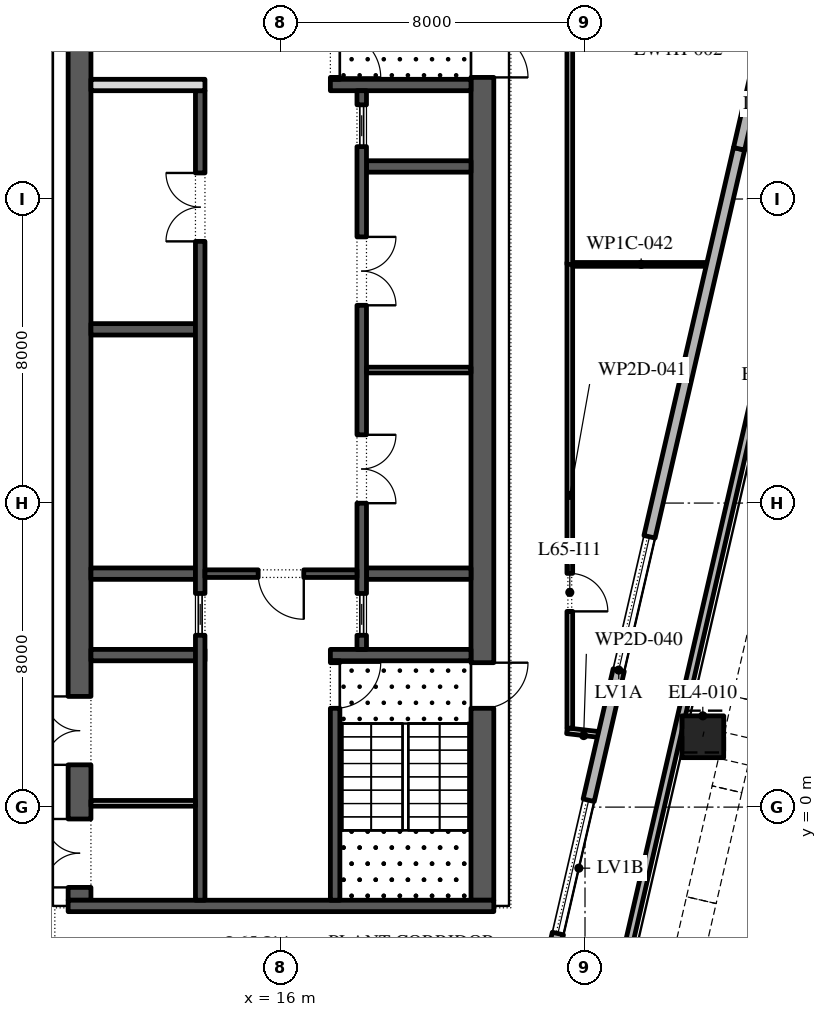
"""IFC4 building model, lengths in metres.
Left out: names, types, materials, properties, quantities, classifications, styles, units other than length and angle.
Written with IfcOpenShell. Run it as: python <this file> out.ifc"""

import sys

from ifc_helpers import new_model, si_unit, direction, frame, frame_2d, origin, origin_2d, place, context, subcontext, project, spatial, rectangle, extrude, element, fill, save


model = new_model("IFC4")
c1 = context("Model", 3, precision=1e-05, world=origin(), true_north=direction((0.0, 1.0)))
c2 = subcontext(c1, "Body", "Model", "MODEL_VIEW")
j1 = project(units=[si_unit("LENGTHUNIT", "METRE"), si_unit("PLANEANGLEUNIT", "RADIAN")], contexts=[c1])
p1 = place(None, origin())
s1 = spatial("IfcSite", under=j1, at=p1, CompositionType="ELEMENT")
p2 = place(p1, origin())
s2 = spatial("IfcBuilding", under=s1, at=p2, CompositionType="ELEMENT")
p3 = place(p2, frame((0.0, 0.0, 297.6)))
s3 = spatial("IfcBuildingStorey", under=s2, at=p3, CompositionType="ELEMENT", Elevation=297.6)
p4 = place(p3, frame((27.099, 1.851, 0.0), z_axis=(0.005875588108, 0.025265028863, 0.999663521282), x_axis=(-0.974008027039, 0.22651349466, 0.0)))
e1 = element("IfcColumn", 1, at=p4, inside=s3, PredefinedType="COLUMN", context=c2, shape_type="SweptSolid", body=[
    extrude(rectangle(XDim=1.1, YDim=1.1, at=origin_2d()), origin(), (0.0, 0.0, 1.0), 5.402),
])
p5 = place(p3, frame((22.757, -13.982, -0.05), z_axis=(0.0, 0.0, 1.0), x_axis=(0.224947491476, 0.974370887331, 0.0)))
e2 = element("IfcWall", 2, at=p5, inside=s3, PredefinedType="STANDARD", context=c2, shape_type="SweptSolid", body=[
    extrude(rectangle(XDim=58.769, YDim=0.2, at=frame_2d((29.385, 0.0))), origin(), (0.0, 0.0, 1.0), 1.1),
])
p6 = place(p3, frame((21.3, -2.45, 0.0), z_axis=(0.0, 0.0, 1.0), x_axis=(0.0, 1.0, 0.0)))
e3 = element("IfcWall", 3, at=p6, inside=s3, PredefinedType="SHEAR", context=c2, shape_type="SweptSolid", body=[
    extrude(rectangle(XDim=27.9, YDim=0.6, at=frame_2d((13.95, 0.0))), origin(), (0.0, 0.0, 1.0), 4.95),
])
p7 = place(p6, frame((5.05, 0.0, 0.0)))
e4 = element("IfcOpeningElement", 4, at=p7, cuts=e3, PredefinedType="OPENING", context=c2, shape_type="SweptSolid", body=[
    extrude(rectangle(XDim=1.2, YDim=2.1, at=frame_2d((0.6, 1.05))), frame((0.0, 0.31, 0.0), z_axis=(0.0, -1.0, 0.0), x_axis=(1.0, 0.0, 0.0)), (0.0, 0.0, 1.0), 0.62),
])
p8 = place(p6, frame((21.65, 0.0, 0.0)))
e5 = element("IfcOpeningElement", 5, at=p8, cuts=e3, PredefinedType="OPENING", context=c2, shape_type="SweptSolid", body=[
    extrude(rectangle(XDim=1.2, YDim=2.1, at=frame_2d((0.6, 1.05))), frame((0.0, 0.31, 0.0), z_axis=(0.0, -1.0, 0.0), x_axis=(1.0, 0.0, 0.0)), (0.0, 0.0, 1.0), 0.62),
])
p9 = place(p3, frame((10.7, -2.45, 0.0), z_axis=(0.0, 0.0, 1.0), x_axis=(0.0, 1.0, 0.0)))
e6 = element("IfcWall", 6, at=p9, inside=s3, PredefinedType="SHEAR", context=c2, shape_type="SweptSolid", body=[
    extrude(rectangle(XDim=27.9, YDim=0.6, at=frame_2d((13.95, 0.0))), origin(), (0.0, 0.0, 1.0), 4.95),
])
p10 = place(p9, frame((23.65, 0.0, 0.0)))
e7 = element("IfcOpeningElement", 7, at=p10, cuts=e6, PredefinedType="OPENING", context=c2, shape_type="SweptSolid", body=[
    extrude(rectangle(XDim=2.4, YDim=2.1, at=frame_2d((1.2, 1.05))), frame((0.0, 0.31, 0.0), z_axis=(0.0, -1.0, 0.0), x_axis=(1.0, 0.0, 0.0)), (0.0, 0.0, 1.0), 0.62),
])
p11 = place(p9, frame((0.337, 0.0, 0.0)))
e8 = element("IfcOpeningElement", 8, at=p11, cuts=e6, PredefinedType="OPENING", context=c2, shape_type="SweptSolid", body=[
    extrude(rectangle(XDim=1.8, YDim=2.4, at=frame_2d((0.9, 1.2))), frame((0.0, 0.31, 0.0), z_axis=(0.0, -1.0, 0.0), x_axis=(1.0, 0.0, 0.0)), (0.0, 0.0, 1.0), 0.62),
])
p12 = place(p9, frame((3.562, 0.0, 0.0)))
e9 = element("IfcOpeningElement", 9, at=p12, cuts=e6, PredefinedType="OPENING", context=c2, shape_type="SweptSolid", body=[
    extrude(rectangle(XDim=1.8, YDim=2.4, at=frame_2d((0.9, 1.2))), frame((0.0, 0.31, 0.0), z_axis=(0.0, -1.0, 0.0), x_axis=(1.0, 0.0, 0.0)), (0.0, 0.0, 1.0), 0.62),
])
p13 = place(p3, frame((10.4, -2.6, 0.0), z_axis=(0.0, 0.0, 1.0), x_axis=(1.0, 0.0, 0.0)))
e10 = element("IfcWall", 10, at=p13, inside=s3, PredefinedType="SHEAR", context=c2, shape_type="SweptSolid", body=[
    extrude(rectangle(XDim=11.2, YDim=0.3, at=frame_2d((5.6, 0.0))), origin(), (0.0, 0.0, 1.0), 4.95),
])
p14 = place(p3, frame((17.3, 4.0, 0.0), z_axis=(0.0, 0.0, 1.0), x_axis=(1.0, 0.0, 0.0)))
e11 = element("IfcWall", 11, at=p14, inside=s3, PredefinedType="SHEAR", context=c2, shape_type="SweptSolid", body=[
    extrude(rectangle(XDim=3.7, YDim=0.3, at=frame_2d((1.85, 0.0))), origin(), (0.0, 0.0, 1.0), 4.95),
])
p15 = place(p3, frame((17.425, -2.45, 0.0), z_axis=(0.0, 0.0, 1.0), x_axis=(0.0, 1.0, 0.0)))
e12 = element("IfcWall", 12, at=p15, inside=s3, PredefinedType="SHEAR", context=c2, shape_type="SweptSolid", body=[
    extrude(rectangle(XDim=6.3, YDim=0.25, at=frame_2d((3.15, 0.0))), origin(), (0.0, 0.0, 1.0), 4.95),
])
p16 = place(p15, frame((5.05, 0.0, 0.0)))
e13 = element("IfcOpeningElement", 13, at=p16, cuts=e12, PredefinedType="OPENING", context=c2, shape_type="SweptSolid", body=[
    extrude(rectangle(XDim=1.2, YDim=2.1, at=frame_2d((0.6, 1.05))), frame((0.0, 0.135, 0.0), z_axis=(0.0, -1.0, 0.0), x_axis=(1.0, 0.0, 0.0)), (0.0, 0.0, 1.0), 0.27),
])
p17 = place(p3, frame((17.3, 19.0, 0.0), z_axis=(0.0, 0.0, 1.0), x_axis=(1.0, 0.0, 0.0)))
e14 = element("IfcWall", 14, at=p17, inside=s3, PredefinedType="SHEAR", context=c2, shape_type="SweptSolid", body=[
    extrude(rectangle(XDim=3.7, YDim=0.3, at=frame_2d((1.85, 0.0))), origin(), (0.0, 0.0, 1.0), 4.95),
])
p18 = place(p3, frame((17.425, 19.15, 0.0), z_axis=(0.0, 0.0, 1.0), x_axis=(0.0, 1.0, 0.0)))
e15 = element("IfcWall", 15, at=p18, inside=s3, PredefinedType="SHEAR", context=c2, shape_type="SweptSolid", body=[
    extrude(rectangle(XDim=6.3, YDim=0.25, at=frame_2d((3.15, 0.0))), origin(), (0.0, 0.0, 1.0), 4.95),
])
p19 = place(p18, frame((0.05, 0.0, 0.0)))
e16 = element("IfcOpeningElement", 16, at=p19, cuts=e15, PredefinedType="OPENING", context=c2, shape_type="SweptSolid", body=[
    extrude(rectangle(XDim=1.2, YDim=2.1, at=frame_2d((0.6, 1.05))), frame((0.0, 0.135, 0.0), z_axis=(0.0, -1.0, 0.0), x_axis=(1.0, 0.0, 0.0)), (0.0, 0.0, 1.0), 0.27),
])
for number, where, z_axis, x_axis in (
    (17, (18.25, 6.143, 0.0), (0.0, 0.0, 1.0), (1.0, 0.0, 0.0)),
    (18, (18.25, 16.857, 0.0), (0.0, 0.0, 1.0), (1.0, 0.0, 0.0)),
):
    element("IfcWall", number, at=place(p3, frame(where, z_axis=z_axis, x_axis=x_axis)), inside=s3, PredefinedType="SHEAR", context=c2, shape_type="SweptSolid", body=[
        extrude(rectangle(XDim=2.75, YDim=0.3, at=frame_2d((1.375, 0.0))), origin(), (0.0, 0.0, 1.0), 4.95),
    ])
p20 = place(p3, frame((18.125, 4.15, 0.0), z_axis=(0.0, 0.0, 1.0), x_axis=(0.0, 1.0, 0.0)))
e19 = element("IfcWall", 19, at=p20, inside=s3, PredefinedType="SHEAR", context=c2, shape_type="SweptSolid", body=[
    extrude(rectangle(XDim=14.7, YDim=0.25, at=frame_2d((7.35, 0.0))), origin(), (0.0, 0.0, 1.0), 4.95),
])
p21 = place(p20, frame((3.846, 0.0, 0.0)))
e20 = element("IfcOpeningElement", 20, at=p21, cuts=e19, PredefinedType="OPENING", context=c2, shape_type="SweptSolid", body=[
    extrude(rectangle(XDim=1.8, YDim=2.4, at=frame_2d((0.9, 1.2))), frame((0.0, 0.135, 0.0), z_axis=(0.0, -1.0, 0.0), x_axis=(1.0, 0.0, 0.0)), (0.0, 0.0, 1.0), 0.27),
])
p22 = place(p20, frame((9.054, 0.0, 0.0)))
e21 = element("IfcOpeningElement", 21, at=p22, cuts=e19, PredefinedType="OPENING", context=c2, shape_type="SweptSolid", body=[
    extrude(rectangle(XDim=1.8, YDim=2.4, at=frame_2d((0.9, 1.2))), frame((0.0, 0.135, 0.0), z_axis=(0.0, -1.0, 0.0), x_axis=(1.0, 0.0, 0.0)), (0.0, 0.0, 1.0), 0.27),
])
p23 = place(p20, frame((0.371, 0.0, 0.0)))
e22 = element("IfcOpeningElement", 22, at=p23, cuts=e19, PredefinedType="OPENING", context=c2, shape_type="SweptSolid", body=[
    extrude(rectangle(XDim=1.1, YDim=2.1, at=frame_2d((0.55, 1.05))), frame((0.0, 0.135, 0.0), z_axis=(0.0, -1.0, 0.0), x_axis=(1.0, 0.0, 0.0)), (0.0, 0.0, 1.0), 0.27),
])
p24 = place(p20, frame((13.229, 0.0, 0.0)))
e23 = element("IfcOpeningElement", 23, at=p24, cuts=e19, PredefinedType="OPENING", context=c2, shape_type="SweptSolid", body=[
    extrude(rectangle(XDim=1.1, YDim=2.1, at=frame_2d((0.55, 1.05))), frame((0.0, 0.135, 0.0), z_axis=(0.0, -1.0, 0.0), x_axis=(1.0, 0.0, 0.0)), (0.0, 0.0, 1.0), 0.27),
])
p25 = place(p3, frame((18.25, 11.5, 0.0), z_axis=(0.0, 0.0, 1.0), x_axis=(1.0, 0.0, 0.0)))
e24 = element("IfcWall", 24, at=p25, inside=s3, PredefinedType="PARTITIONING", context=c2, shape_type="SweptSolid", body=[
    extrude(rectangle(XDim=2.75, YDim=0.15, at=frame_2d((1.375, 0.0))), origin(), (0.0, 0.0, 1.0), 4.95),
])
p26 = place(p3, frame((11.0, 4.0, 0.0), z_axis=(0.0, 0.0, 1.0), x_axis=(1.0, 0.0, 0.0)))
e25 = element("IfcWall", 25, at=p26, inside=s3, PredefinedType="SHEAR", context=c2, shape_type="SweptSolid", body=[
    extrude(rectangle(XDim=3.0, YDim=0.3, at=frame_2d((1.5, 0.0))), origin(), (0.0, 0.0, 1.0), 4.95),
])
for number, where, z_axis, x_axis in (
    (26, (11.0, 6.143, 0.0), (0.0, 0.0, 1.0), (1.0, 0.0, 0.0)),
    (27, (11.0, 12.571, 0.0), (0.0, 0.0, 1.0), (1.0, 0.0, 0.0)),
):
    element("IfcWall", number, at=place(p3, frame(where, z_axis=z_axis, x_axis=x_axis)), inside=s3, PredefinedType="SHEAR", context=c2, shape_type="SweptSolid", body=[
        extrude(rectangle(XDim=2.75, YDim=0.3, at=frame_2d((1.375, 0.0))), origin(), (0.0, 0.0, 1.0), 4.95),
    ])
p27 = place(p3, frame((13.875, -2.45, 0.0), z_axis=(0.0, 0.0, 1.0), x_axis=(0.0, 1.0, 0.0)))
e28 = element("IfcWall", 28, at=p27, inside=s3, PredefinedType="SHEAR", context=c2, shape_type="SweptSolid", body=[
    extrude(rectangle(XDim=21.3, YDim=0.25, at=frame_2d((10.65, 0.0))), origin(), (0.0, 0.0, 1.0), 4.95),
])
p28 = place(p27, frame((17.336, 0.0, 0.0)))
e29 = element("IfcOpeningElement", 29, at=p28, cuts=e28, PredefinedType="OPENING", context=c2, shape_type="SweptSolid", body=[
    extrude(rectangle(XDim=1.8, YDim=2.4, at=frame_2d((0.9, 1.2))), frame((0.0, 0.135, 0.0), z_axis=(0.0, -1.0, 0.0), x_axis=(1.0, 0.0, 0.0)), (0.0, 0.0, 1.0), 0.27),
])
p29 = place(p27, frame((6.971, 0.0, 0.0)))
e30 = element("IfcOpeningElement", 30, at=p29, cuts=e28, PredefinedType="OPENING", context=c2, shape_type="SweptSolid", body=[
    extrude(rectangle(XDim=1.1, YDim=2.1, at=frame_2d((0.55, 1.05))), frame((0.0, 0.135, 0.0), z_axis=(0.0, -1.0, 0.0), x_axis=(1.0, 0.0, 0.0)), (0.0, 0.0, 1.0), 0.27),
])
p30 = place(p3, frame((11.0, 19.0, 0.0), z_axis=(0.0, 0.0, 1.0), x_axis=(1.0, 0.0, 0.0)))
e31 = element("IfcWall", 31, at=p30, inside=s3, PredefinedType="PARTITIONING", context=c2, shape_type="SweptSolid", body=[
    extrude(rectangle(XDim=3.0, YDim=0.3, at=frame_2d((1.5, 0.0))), origin(), (0.0, 0.0, 1.0), 4.95),
])
p31 = place(p3, frame((14.0, 6.143, 0.0), z_axis=(0.0, 0.0, 1.0), x_axis=(1.0, 0.0, 0.0)))
e32 = element("IfcWall", 32, at=p31, inside=s3, PredefinedType="SHEAR", context=c2, shape_type="SweptSolid", body=[
    extrude(rectangle(XDim=4.0, YDim=0.2, at=frame_2d((2.0, 0.0))), origin(), (0.0, 0.0, 1.0), 4.95),
])
p32 = place(p31, frame((1.4, 0.0, 0.0)))
e33 = element("IfcOpeningElement", 33, at=p32, cuts=e32, PredefinedType="OPENING", context=c2, shape_type="SweptSolid", body=[
    extrude(rectangle(XDim=1.2, YDim=2.1, at=frame_2d((0.6, 1.05))), frame((0.0, 0.11, 0.0), z_axis=(0.0, -1.0, 0.0), x_axis=(1.0, 0.0, 0.0)), (0.0, 0.0, 1.0), 0.22),
])
p33 = place(p3, frame((11.0, 0.1, 0.0), z_axis=(0.0, 0.0, 1.0), x_axis=(1.0, 0.0, 0.0)))
e34 = element("IfcWall", 34, at=p33, inside=s3, PredefinedType="PARTITIONING", context=c2, shape_type="SweptSolid", body=[
    extrude(rectangle(XDim=2.75, YDim=0.15, at=frame_2d((1.375, 0.0))), origin(), (0.0, 0.0, 1.0), 4.95),
])
p34 = place(p3, frame((23.525, 2.009, 0.0), z_axis=(0.0, 0.0, 1.0), x_axis=(0.993362737156, -0.115023790712, 0.0)))
e35 = element("IfcWall", 35, at=p34, inside=s3, PredefinedType="PARTITIONING", context=c2, shape_type="SweptSolid", body=[
    extrude(rectangle(XDim=0.904, YDim=0.15, at=frame_2d((0.452, 0.0))), origin(), (0.0, 0.0, 1.0), 4.95),
])
p35 = place(p3, frame((23.6, 14.33, 0.0), z_axis=(0.0, 0.0, 1.0), x_axis=(0.0, -1.0, 0.0)))
e36 = element("IfcWall", 36, at=p35, inside=s3, PredefinedType="PARTITIONING", context=c2, shape_type="SweptSolid", body=[
    extrude(rectangle(XDim=12.255, YDim=0.15, at=frame_2d((6.127, 0.0))), origin(), (0.0, 0.0, 1.0), 4.95),
])
p36 = place(p35, frame((8.18, 0.0, 0.0)))
e37 = element("IfcOpeningElement", 37, at=p36, cuts=e36, PredefinedType="OPENING", context=c2, shape_type="SweptSolid", body=[
    extrude(rectangle(XDim=1.0, YDim=2.1, at=frame_2d((0.5, 1.05))), frame((0.0, 0.085, 0.0), z_axis=(0.0, -1.0, 0.0), x_axis=(1.0, 0.0, 0.0)), (0.0, 0.0, 1.0), 0.17),
])
p37 = place(p3, frame((23.675, 14.28, 0.0), z_axis=(0.0, 0.0, 1.0), x_axis=(1.0, 0.0, 0.0)))
e38 = element("IfcWall", 38, at=p37, inside=s3, PredefinedType="PARTITIONING", context=c2, shape_type="SweptSolid", body=[
    extrude(rectangle(XDim=3.605, YDim=0.1, at=frame_2d((1.802, 0.0))), origin(), (0.0, 0.0, 1.0), 4.95),
])
p38 = place(p3, frame((23.6, 42.076, 0.0), z_axis=(0.0, 0.0, 1.0), x_axis=(0.0, -1.0, 0.0)))
e39 = element("IfcWall", 39, at=p38, inside=s3, PredefinedType="PARTITIONING", context=c2, shape_type="SweptSolid", body=[
    extrude(rectangle(XDim=27.796, YDim=0.15, at=frame_2d((13.898, 0.0))), origin(), (0.0, 0.0, 1.0), 4.95),
])
p39 = place(p38, frame((10.396, 0.0, 0.0)))
e40 = element("IfcOpeningElement", 40, at=p39, cuts=e39, PredefinedType="OPENING", context=c2, shape_type="SweptSolid", body=[
    extrude(rectangle(XDim=1.0, YDim=2.1, at=frame_2d((0.5, 1.05))), frame((0.0, 0.085, 0.0), z_axis=(0.0, -1.0, 0.0), x_axis=(1.0, 0.0, 0.0)), (0.0, 0.0, 1.0), 0.17),
])
p40 = place(p3, frame((22.789, -5.485, 0.0), z_axis=(0.0, 0.0, 1.0), x_axis=(0.224937970591, 0.974373085315, 0.0)))
e41 = element("IfcWall", 41, at=p40, inside=s3, PredefinedType="STANDARD", context=c2, shape_type="SweptSolid", body=[
    extrude(rectangle(XDim=23.406, YDim=0.3, at=frame_2d((11.703, 0.0))), origin(), (0.0, 0.0, 1.0), 4.95),
])
p41 = place(p40, frame((2.215, 0.0, 0.6)))
e42 = element("IfcOpeningElement", 42, at=p41, cuts=e41, PredefinedType="OPENING", context=c2, shape_type="SweptSolid", body=[
    extrude(rectangle(XDim=3.6, YDim=3.8, at=frame_2d((1.8, 1.9))), frame((0.0, 0.16, 0.0), z_axis=(0.0, -1.0, 0.0), x_axis=(1.0, 0.0, 0.0)), (0.0, 0.0, 1.0), 0.32),
])
p42 = place(p40, frame((9.329, 0.0, 0.6)))
e43 = element("IfcOpeningElement", 43, at=p42, cuts=e41, PredefinedType="OPENING", context=c2, shape_type="SweptSolid", body=[
    extrude(rectangle(XDim=3.6, YDim=3.85, at=frame_2d((1.8, 1.925))), frame((0.0, 0.16, 0.0), z_axis=(0.0, -1.0, 0.0), x_axis=(1.0, 0.0, 0.0)), (0.0, 0.0, 1.0), 0.32),
])
p43 = place(p3, frame((28.054, 17.321, 0.0), z_axis=(0.0, 0.0, 1.0), x_axis=(0.224970521667, 0.974365570195, 0.0)))
e44 = element("IfcWall", 44, at=p43, inside=s3, PredefinedType="STANDARD", context=c2, shape_type="SweptSolid", body=[
    extrude(rectangle(XDim=5.3, YDim=0.3, at=frame_2d((2.65, 0.0))), origin(), (0.0, 0.0, 1.0), 4.05),
])
p44 = place(p41, origin())
e45 = element("IfcWindow", 45, at=p44, inside=s3, PartitioningType="DOUBLE_PANEL_HORIZONTAL", PredefinedType="WINDOW", context=c2, shape_type="SweptSolid", body=[
    extrude(rectangle(XDim=3.6, YDim=3.8, at=frame_2d((1.8, 1.9))), frame((0.0, 0.03, 0.0), z_axis=(0.0, -1.0, 0.0), x_axis=(1.0, 0.0, 0.0)), (0.0, 0.0, 1.0), 0.06),
])
fill(e42, e45)
p45 = place(p42, origin())
e46 = element("IfcWindow", 46, at=p45, inside=s3, PartitioningType="DOUBLE_PANEL_HORIZONTAL", PredefinedType="WINDOW", context=c2, shape_type="SweptSolid", body=[
    extrude(rectangle(XDim=3.6, YDim=3.85, at=frame_2d((1.8, 1.925))), frame((0.0, 0.03, 0.0), z_axis=(0.0, -1.0, 0.0), x_axis=(1.0, 0.0, 0.0)), (0.0, 0.0, 1.0), 0.06),
])
fill(e43, e46)
p46 = place(p21, frame((1.8, -0.2, 0.0), z_axis=(0.0, 0.0, 1.0), x_axis=(-1.0, 0.0, 0.0)))
e47 = element("IfcDoor", 47, at=p46, inside=s3, OperationType="DOUBLE_DOOR_SINGLE_SWING", PredefinedType="DOOR", context=c2, shape_type="SweptSolid", body=[
    extrude(rectangle(XDim=1.8, YDim=2.4, at=frame_2d((0.9, 1.2))), frame((0.0, -0.075, 0.0), z_axis=(0.0, -1.0, 0.0), x_axis=(1.0, 0.0, 0.0)), (0.0, 0.0, 1.0), 0.05),
])
fill(e20, e47)
p47 = place(p22, frame((1.8, -0.2, 0.0), z_axis=(0.0, 0.0, 1.0), x_axis=(-1.0, 0.0, 0.0)))
e48 = element("IfcDoor", 48, at=p47, inside=s3, OperationType="DOUBLE_DOOR_SINGLE_SWING", PredefinedType="DOOR", context=c2, shape_type="SweptSolid", body=[
    extrude(rectangle(XDim=1.8, YDim=2.4, at=frame_2d((0.9, 1.2))), frame((0.0, -0.075, 0.0), z_axis=(0.0, -1.0, 0.0), x_axis=(1.0, 0.0, 0.0)), (0.0, 0.0, 1.0), 0.05),
])
fill(e21, e48)
p48 = place(p23, origin())
e49 = element("IfcDoor", 49, at=p48, inside=s3, OperationType="SLIDING_TO_LEFT", PredefinedType="DOOR", context=c2, shape_type="SweptSolid", body=[
    extrude(rectangle(XDim=1.1, YDim=2.1, at=frame_2d((0.55, 1.05))), frame((0.0, 0.025, 0.0), z_axis=(0.0, -1.0, 0.0), x_axis=(1.0, 0.0, 0.0)), (0.0, 0.0, 1.0), 0.05),
])
fill(e22, e49)
p49 = place(p24, origin())
e50 = element("IfcDoor", 50, at=p49, inside=s3, OperationType="SLIDING_TO_LEFT", PredefinedType="DOOR", context=c2, shape_type="SweptSolid", body=[
    extrude(rectangle(XDim=1.1, YDim=2.1, at=frame_2d((0.55, 1.05))), frame((0.0, 0.025, 0.0), z_axis=(0.0, -1.0, 0.0), x_axis=(1.0, 0.0, 0.0)), (0.0, 0.0, 1.0), 0.05),
])
fill(e23, e50)
p50 = place(p28, origin())
e51 = element("IfcDoor", 51, at=p50, inside=s3, OperationType="DOUBLE_DOOR_SINGLE_SWING", PredefinedType="DOOR", context=c2, shape_type="SweptSolid", body=[
    extrude(rectangle(XDim=1.8, YDim=2.4, at=frame_2d((0.9, 1.2))), frame((0.0, 0.125, 0.0), z_axis=(0.0, -1.0, 0.0), x_axis=(1.0, 0.0, 0.0)), (0.0, 0.0, 1.0), 0.05),
])
fill(e29, e51)
p51 = place(p29, origin())
e52 = element("IfcDoor", 52, at=p51, inside=s3, OperationType="SLIDING_TO_LEFT", PredefinedType="DOOR", context=c2, shape_type="SweptSolid", body=[
    extrude(rectangle(XDim=1.1, YDim=2.1, at=frame_2d((0.55, 1.05))), frame((0.0, 0.025, 0.0), z_axis=(0.0, -1.0, 0.0), x_axis=(1.0, 0.0, 0.0)), (0.0, 0.0, 1.0), 0.05),
])
fill(e30, e52)
p52 = place(p32, frame((1.2, 0.0, 0.0), z_axis=(0.0, 0.0, 1.0), x_axis=(-1.0, 0.0, 0.0)))
e53 = element("IfcDoor", 53, at=p52, inside=s3, OperationType="SINGLE_SWING_RIGHT", PredefinedType="DOOR", context=c2, shape_type="SweptSolid", body=[
    extrude(rectangle(XDim=1.2, YDim=2.1, at=frame_2d((0.6, 1.05))), frame((0.0, 0.025, 0.0), z_axis=(0.0, -1.0, 0.0), x_axis=(1.0, 0.0, 0.0)), (0.0, 0.0, 1.0), 0.05),
])
fill(e33, e53)
p53 = place(p16, frame((1.2, 0.0, 0.0), z_axis=(0.0, 0.0, 1.0), x_axis=(-1.0, 0.0, 0.0)))
e54 = element("IfcDoor", 54, at=p53, inside=s3, OperationType="SINGLE_SWING_RIGHT", PredefinedType="DOOR", context=c2, shape_type="SweptSolid", body=[
    extrude(rectangle(XDim=1.2, YDim=2.1, at=frame_2d((0.6, 1.05))), frame((0.0, 0.025, 0.0), z_axis=(0.0, -1.0, 0.0), x_axis=(1.0, 0.0, 0.0)), (0.0, 0.0, 1.0), 0.05),
])
fill(e13, e54)
p54 = place(p7, frame((1.2, 0.0, 0.0), z_axis=(0.0, 0.0, 1.0), x_axis=(-1.0, 0.0, 0.0)))
e55 = element("IfcDoor", 55, at=p54, inside=s3, OperationType="SINGLE_SWING_RIGHT", PredefinedType="DOOR", context=c2, shape_type="SweptSolid", body=[
    extrude(rectangle(XDim=1.2, YDim=2.1, at=frame_2d((0.6, 1.05))), frame((0.0, 0.025, 0.0), z_axis=(0.0, -1.0, 0.0), x_axis=(1.0, 0.0, 0.0)), (0.0, 0.0, 1.0), 0.05),
])
fill(e4, e55)
p55 = place(p19, frame((1.2, 0.0, 0.0), z_axis=(0.0, 0.0, 1.0), x_axis=(-1.0, 0.0, 0.0)))
e56 = element("IfcDoor", 56, at=p55, inside=s3, OperationType="SINGLE_SWING_LEFT", PredefinedType="DOOR", context=c2, shape_type="SweptSolid", body=[
    extrude(rectangle(XDim=1.2, YDim=2.1, at=frame_2d((0.6, 1.05))), frame((0.0, 0.025, 0.0), z_axis=(0.0, -1.0, 0.0), x_axis=(1.0, 0.0, 0.0)), (0.0, 0.0, 1.0), 0.05),
])
fill(e16, e56)
p56 = place(p8, frame((1.2, 0.0, 0.0), z_axis=(0.0, 0.0, 1.0), x_axis=(-1.0, 0.0, 0.0)))
e57 = element("IfcDoor", 57, at=p56, inside=s3, OperationType="SINGLE_SWING_LEFT", PredefinedType="DOOR", context=c2, shape_type="SweptSolid", body=[
    extrude(rectangle(XDim=1.2, YDim=2.1, at=frame_2d((0.6, 1.05))), frame((0.0, 0.025, 0.0), z_axis=(0.0, -1.0, 0.0), x_axis=(1.0, 0.0, 0.0)), (0.0, 0.0, 1.0), 0.05),
])
fill(e5, e57)
p57 = place(p11, origin())
e58 = element("IfcDoor", 58, at=p57, inside=s3, OperationType="DOUBLE_DOOR_SINGLE_SWING", PredefinedType="DOOR", context=c2, shape_type="SweptSolid", body=[
    extrude(rectangle(XDim=1.8, YDim=2.4, at=frame_2d((0.9, 1.2))), frame((0.0, -0.25, 0.0), z_axis=(0.0, -1.0, 0.0), x_axis=(1.0, 0.0, 0.0)), (0.0, 0.0, 1.0), 0.05),
])
fill(e8, e58)
p58 = place(p12, origin())
e59 = element("IfcDoor", 59, at=p58, inside=s3, OperationType="DOUBLE_DOOR_SINGLE_SWING", PredefinedType="DOOR", context=c2, shape_type="SweptSolid", body=[
    extrude(rectangle(XDim=1.8, YDim=2.4, at=frame_2d((0.9, 1.2))), frame((0.0, -0.25, 0.0), z_axis=(0.0, -1.0, 0.0), x_axis=(1.0, 0.0, 0.0)), (0.0, 0.0, 1.0), 0.05),
])
fill(e9, e59)
p59 = place(p36, origin())
e60 = element("IfcDoor", 60, at=p59, inside=s3, OperationType="SINGLE_SWING_LEFT", PredefinedType="DOOR", context=c2, shape_type="SweptSolid", body=[
    extrude(rectangle(XDim=1.0, YDim=2.1, at=frame_2d((0.5, 1.05))), frame((0.0, 0.025, 0.0), z_axis=(0.0, -1.0, 0.0), x_axis=(1.0, 0.0, 0.0)), (0.0, 0.0, 1.0), 0.05),
])
fill(e37, e60)
save(model, sys.argv[1])
